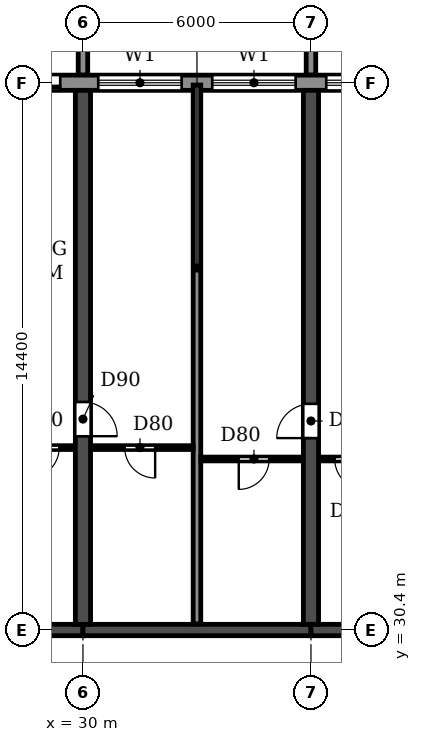
"""IFC4 building model, lengths in metres.
Left out: names, types, materials, properties, quantities, classifications, styles, units other than length and angle.
Written with IfcOpenShell. Run it as: python <this file> out.ifc"""

import sys

from ifc_helpers import new_model, si_unit, direction, frame, frame_2d, origin, place, context, subcontext, project, spatial, polyline, rectangle, outline, extrude, source, transform, mapped, element, fill, save


model = new_model("IFC4")
c1 = context("Model", 3, precision=1e-05, world=origin(), true_north=direction((0.0, 1.0)))
c2 = subcontext(c1, "Body", "Model", "MODEL_VIEW")
j1 = project(units=[si_unit("LENGTHUNIT", "METRE"), si_unit("PLANEANGLEUNIT", "RADIAN")], contexts=[c1])
p1 = place(None, origin())
s1 = spatial("IfcSite", under=j1, at=p1, CompositionType="ELEMENT")
p2 = place(p1, origin())
s2 = spatial("IfcBuilding", under=s1, at=p2, CompositionType="ELEMENT")
p3 = place(p2, frame((0.0, 0.0, 33.3)))
s3 = spatial("IfcBuildingStorey", under=s2, at=p3, CompositionType="ELEMENT", Elevation=33.3)
p4 = place(p3, frame((30.0, 30.55, 0.0), z_axis=(0.0, 0.0, 1.0), x_axis=(0.0, 1.0, 0.0)))
e1 = element("IfcWall", 1, at=p4, inside=s3, PredefinedType="SHEAR", context=c2, shape_type="SweptSolid", body=[
    extrude(rectangle(XDim=14.05, YDim=0.4, at=frame_2d((7.025, 0.0))), origin(), (0.0, 0.0, 1.0), 3.05),
])
p5 = place(p4, frame((4.95, 0.0, 0.0)))
e2 = element("IfcOpeningElement", 2, at=p5, cuts=e1, PredefinedType="OPENING", context=c2, shape_type="SweptSolid", body=[
    extrude(rectangle(XDim=0.9, YDim=2.1, at=frame_2d((0.45, 1.05))), frame((0.0, 0.21, 0.0), z_axis=(0.0, -1.0, 0.0), x_axis=(1.0, 0.0, 0.0)), (0.0, 0.0, 1.0), 0.42),
])
p6 = place(p3, frame((36.0, 30.55, 0.0), z_axis=(0.0, 0.0, 1.0), x_axis=(0.0, 1.0, 0.0)))
e3 = element("IfcWall", 3, at=p6, inside=s3, PredefinedType="SHEAR", context=c2, shape_type="SweptSolid", body=[
    extrude(rectangle(XDim=14.05, YDim=0.4, at=frame_2d((7.025, 0.0))), origin(), (0.0, 0.0, 1.0), 3.05),
])
p7 = place(p6, frame((4.9, 0.0, 0.0)))
e4 = element("IfcOpeningElement", 4, at=p7, cuts=e3, PredefinedType="OPENING", context=c2, shape_type="SweptSolid", body=[
    extrude(rectangle(XDim=0.9, YDim=2.1, at=frame_2d((0.45, 1.05))), frame((0.0, 0.21, 0.0), z_axis=(0.0, -1.0, 0.0), x_axis=(1.0, 0.0, 0.0)), (0.0, 0.0, 1.0), 0.42),
])
p8 = place(p3, frame((24.0, 30.4, 0.0), z_axis=(0.0, 0.0, 1.0), x_axis=(1.0, 0.0, 0.0)))
e5 = element("IfcWall", 5, at=p8, inside=s3, PredefinedType="SHEAR", context=c2, shape_type="SweptSolid", body=[
    extrude(rectangle(XDim=6.0, YDim=0.3, at=frame_2d((3.0, 0.0))), origin(), (0.0, 0.0, 1.0), 2.45),
])
p9 = place(p8, frame((2.55, 0.0, 0.0)))
e6 = element("IfcOpeningElement", 6, at=p9, cuts=e5, PredefinedType="OPENING", context=c2, shape_type="SweptSolid", body=[
    extrude(rectangle(XDim=1.0, YDim=2.1, at=frame_2d((0.5, 1.05))), frame((0.0, 0.16, 0.0), z_axis=(0.0, -1.0, 0.0), x_axis=(1.0, 0.0, 0.0)), (0.0, 0.0, 1.0), 0.32),
])
p10 = place(p3, frame((30.0, 30.4, 0.0), z_axis=(0.0, 0.0, 1.0), x_axis=(1.0, 0.0, 0.0)))
e7 = element("IfcWall", 7, at=p10, inside=s3, PredefinedType="SHEAR", context=c2, shape_type="SweptSolid", body=[
    extrude(rectangle(XDim=6.0, YDim=0.3, at=frame_2d((3.0, 0.0))), origin(), (0.0, 0.0, 1.0), 2.45),
])
p11 = place(p3, frame((36.0, 30.4, 0.0), z_axis=(0.0, 0.0, 1.0), x_axis=(1.0, 0.0, 0.0)))
e8 = element("IfcWall", 8, at=p11, inside=s3, PredefinedType="SHEAR", context=c2, shape_type="SweptSolid", body=[
    extrude(rectangle(XDim=6.0, YDim=0.3, at=frame_2d((3.0, 0.0))), origin(), (0.0, 0.0, 1.0), 2.45),
])
p12 = place(p11, frame((2.45, 0.0, 0.0)))
e9 = element("IfcOpeningElement", 9, at=p12, cuts=e8, PredefinedType="OPENING", context=c2, shape_type="SweptSolid", body=[
    extrude(rectangle(XDim=1.0, YDim=2.1, at=frame_2d((0.5, 1.05))), frame((0.0, 0.16, 0.0), z_axis=(0.0, -1.0, 0.0), x_axis=(1.0, 0.0, 0.0)), (0.0, 0.0, 1.0), 0.32),
])
p13 = place(p3, frame((97.317, 44.8, 0.0), z_axis=(0.0, 0.0, 1.0), x_axis=(-1.0, 0.0, 0.0)))
e10 = element("IfcWall", 10, at=p13, inside=s3, PredefinedType="STANDARD", context=c2, shape_type="SweptSolid", body=[
    extrude(rectangle(XDim=92.634, YDim=0.4, at=frame_2d((46.317, 0.0))), origin(), (0.0, 0.0, 1.0), 3.05),
])
p14 = place(p13, frame((88.717, 0.0, 0.9)))
e11 = element("IfcOpeningElement", 11, at=p14, cuts=e10, PredefinedType="OPENING", context=c2, shape_type="SweptSolid", body=[
    extrude(rectangle(XDim=2.2, YDim=1.5, at=frame_2d((1.1, 0.75))), frame((0.0, 0.21, 0.0), z_axis=(0.0, -1.0, 0.0), x_axis=(1.0, 0.0, 0.0)), (0.0, 0.0, 1.0), 0.42),
])
p15 = place(p13, frame((85.917, 0.0, 0.0)))
e12 = element("IfcOpeningElement", 12, at=p15, cuts=e10, PredefinedType="OPENING", context=c2, shape_type="SweptSolid", body=[
    extrude(rectangle(XDim=1.8, YDim=2.4, at=frame_2d((0.9, 1.2))), frame((0.0, 0.21, 0.0), z_axis=(0.0, -1.0, 0.0), x_axis=(1.0, 0.0, 0.0)), (0.0, 0.0, 1.0), 0.42),
])
p16 = place(p13, frame((82.717, 0.0, 0.9)))
e13 = element("IfcOpeningElement", 13, at=p16, cuts=e10, PredefinedType="OPENING", context=c2, shape_type="SweptSolid", body=[
    extrude(rectangle(XDim=2.2, YDim=1.5, at=frame_2d((1.1, 0.75))), frame((0.0, 0.21, 0.0), z_axis=(0.0, -1.0, 0.0), x_axis=(1.0, 0.0, 0.0)), (0.0, 0.0, 1.0), 0.42),
])
p17 = place(p13, frame((79.917, 0.0, 0.0)))
e14 = element("IfcOpeningElement", 14, at=p17, cuts=e10, PredefinedType="OPENING", context=c2, shape_type="SweptSolid", body=[
    extrude(rectangle(XDim=1.8, YDim=2.4, at=frame_2d((0.9, 1.2))), frame((0.0, 0.21, 0.0), z_axis=(0.0, -1.0, 0.0), x_axis=(1.0, 0.0, 0.0)), (0.0, 0.0, 1.0), 0.42),
])
p18 = place(p13, frame((76.717, 0.0, 0.9)))
e15 = element("IfcOpeningElement", 15, at=p18, cuts=e10, PredefinedType="OPENING", context=c2, shape_type="SweptSolid", body=[
    extrude(rectangle(XDim=2.2, YDim=1.5, at=frame_2d((1.1, 0.75))), frame((0.0, 0.21, 0.0), z_axis=(0.0, -1.0, 0.0), x_axis=(1.0, 0.0, 0.0)), (0.0, 0.0, 1.0), 0.42),
])
p19 = place(p13, frame((73.717, 0.0, 0.9)))
e16 = element("IfcOpeningElement", 16, at=p19, cuts=e10, PredefinedType="OPENING", context=c2, shape_type="SweptSolid", body=[
    extrude(rectangle(XDim=2.2, YDim=1.5, at=frame_2d((1.1, 0.75))), frame((0.0, 0.21, 0.0), z_axis=(0.0, -1.0, 0.0), x_axis=(1.0, 0.0, 0.0)), (0.0, 0.0, 1.0), 0.42),
])
p20 = place(p13, frame((70.717, 0.0, 0.9)))
e17 = element("IfcOpeningElement", 17, at=p20, cuts=e10, PredefinedType="OPENING", context=c2, shape_type="SweptSolid", body=[
    extrude(rectangle(XDim=2.2, YDim=1.5, at=frame_2d((1.1, 0.75))), frame((0.0, 0.21, 0.0), z_axis=(0.0, -1.0, 0.0), x_axis=(1.0, 0.0, 0.0)), (0.0, 0.0, 1.0), 0.42),
])
p21 = place(p13, frame((67.917, 0.0, 0.0)))
e18 = element("IfcOpeningElement", 18, at=p21, cuts=e10, PredefinedType="OPENING", context=c2, shape_type="SweptSolid", body=[
    extrude(rectangle(XDim=1.8, YDim=2.4, at=frame_2d((0.9, 1.2))), frame((0.0, 0.21, 0.0), z_axis=(0.0, -1.0, 0.0), x_axis=(1.0, 0.0, 0.0)), (0.0, 0.0, 1.0), 0.42),
])
p22 = place(p13, frame((64.717, 0.0, 0.9)))
e19 = element("IfcOpeningElement", 19, at=p22, cuts=e10, PredefinedType="OPENING", context=c2, shape_type="SweptSolid", body=[
    extrude(rectangle(XDim=2.2, YDim=1.5, at=frame_2d((1.1, 0.75))), frame((0.0, 0.21, 0.0), z_axis=(0.0, -1.0, 0.0), x_axis=(1.0, 0.0, 0.0)), (0.0, 0.0, 1.0), 0.42),
])
p23 = place(p13, frame((61.717, 0.0, 0.9)))
e20 = element("IfcOpeningElement", 20, at=p23, cuts=e10, PredefinedType="OPENING", context=c2, shape_type="SweptSolid", body=[
    extrude(rectangle(XDim=2.2, YDim=1.5, at=frame_2d((1.1, 0.75))), frame((0.0, 0.21, 0.0), z_axis=(0.0, -1.0, 0.0), x_axis=(1.0, 0.0, 0.0)), (0.0, 0.0, 1.0), 0.42),
])
p24 = place(p13, frame((58.717, 0.0, 0.9)))
e21 = element("IfcOpeningElement", 21, at=p24, cuts=e10, PredefinedType="OPENING", context=c2, shape_type="SweptSolid", body=[
    extrude(rectangle(XDim=2.2, YDim=1.5, at=frame_2d((1.1, 0.75))), frame((0.0, 0.21, 0.0), z_axis=(0.0, -1.0, 0.0), x_axis=(1.0, 0.0, 0.0)), (0.0, 0.0, 1.0), 0.42),
])
p25 = place(p13, frame((55.917, 0.0, 0.0)))
e22 = element("IfcOpeningElement", 22, at=p25, cuts=e10, PredefinedType="OPENING", context=c2, shape_type="SweptSolid", body=[
    extrude(rectangle(XDim=1.8, YDim=2.4, at=frame_2d((0.9, 1.2))), frame((0.0, 0.21, 0.0), z_axis=(0.0, -1.0, 0.0), x_axis=(1.0, 0.0, 0.0)), (0.0, 0.0, 1.0), 0.42),
])
p26 = place(p13, frame((52.717, 0.0, 0.9)))
e23 = element("IfcOpeningElement", 23, at=p26, cuts=e10, PredefinedType="OPENING", context=c2, shape_type="SweptSolid", body=[
    extrude(rectangle(XDim=2.2, YDim=1.5, at=frame_2d((1.1, 0.75))), frame((0.0, 0.21, 0.0), z_axis=(0.0, -1.0, 0.0), x_axis=(1.0, 0.0, 0.0)), (0.0, 0.0, 1.0), 0.42),
])
p27 = place(p13, frame((49.717, 0.0, 0.9)))
e24 = element("IfcOpeningElement", 24, at=p27, cuts=e10, PredefinedType="OPENING", context=c2, shape_type="SweptSolid", body=[
    extrude(rectangle(XDim=2.2, YDim=1.5, at=frame_2d((1.1, 0.75))), frame((0.0, 0.21, 0.0), z_axis=(0.0, -1.0, 0.0), x_axis=(1.0, 0.0, 0.0)), (0.0, 0.0, 1.0), 0.42),
])
p28 = place(p13, frame((46.717, 0.0, 0.9)))
e25 = element("IfcOpeningElement", 25, at=p28, cuts=e10, PredefinedType="OPENING", context=c2, shape_type="SweptSolid", body=[
    extrude(rectangle(XDim=2.2, YDim=1.5, at=frame_2d((1.1, 0.75))), frame((0.0, 0.21, 0.0), z_axis=(0.0, -1.0, 0.0), x_axis=(1.0, 0.0, 0.0)), (0.0, 0.0, 1.0), 0.42),
])
p29 = place(p13, frame((43.917, 0.0, 0.0)))
e26 = element("IfcOpeningElement", 26, at=p29, cuts=e10, PredefinedType="OPENING", context=c2, shape_type="SweptSolid", body=[
    extrude(rectangle(XDim=1.8, YDim=2.4, at=frame_2d((0.9, 1.2))), frame((0.0, 0.21, 0.0), z_axis=(0.0, -1.0, 0.0), x_axis=(1.0, 0.0, 0.0)), (0.0, 0.0, 1.0), 0.42),
])
p30 = place(p13, frame((40.717, 0.0, 0.9)))
e27 = element("IfcOpeningElement", 27, at=p30, cuts=e10, PredefinedType="OPENING", context=c2, shape_type="SweptSolid", body=[
    extrude(rectangle(XDim=2.2, YDim=1.5, at=frame_2d((1.1, 0.75))), frame((0.0, 0.21, 0.0), z_axis=(0.0, -1.0, 0.0), x_axis=(1.0, 0.0, 0.0)), (0.0, 0.0, 1.0), 0.42),
])
p31 = place(p13, frame((37.717, 0.0, 0.9)))
e28 = element("IfcOpeningElement", 28, at=p31, cuts=e10, PredefinedType="OPENING", context=c2, shape_type="SweptSolid", body=[
    extrude(rectangle(XDim=2.2, YDim=1.5, at=frame_2d((1.1, 0.75))), frame((0.0, 0.21, 0.0), z_axis=(0.0, -1.0, 0.0), x_axis=(1.0, 0.0, 0.0)), (0.0, 0.0, 1.0), 0.42),
])
p32 = place(p13, frame((34.717, 0.0, 0.9)))
e29 = element("IfcOpeningElement", 29, at=p32, cuts=e10, PredefinedType="OPENING", context=c2, shape_type="SweptSolid", body=[
    extrude(rectangle(XDim=2.2, YDim=1.5, at=frame_2d((1.1, 0.75))), frame((0.0, 0.21, 0.0), z_axis=(0.0, -1.0, 0.0), x_axis=(1.0, 0.0, 0.0)), (0.0, 0.0, 1.0), 0.42),
])
p33 = place(p13, frame((31.917, 0.0, 0.0)))
e30 = element("IfcOpeningElement", 30, at=p33, cuts=e10, PredefinedType="OPENING", context=c2, shape_type="SweptSolid", body=[
    extrude(rectangle(XDim=1.8, YDim=2.4, at=frame_2d((0.9, 1.2))), frame((0.0, 0.21, 0.0), z_axis=(0.0, -1.0, 0.0), x_axis=(1.0, 0.0, 0.0)), (0.0, 0.0, 1.0), 0.42),
])
p34 = place(p13, frame((28.717, 0.0, 0.9)))
e31 = element("IfcOpeningElement", 31, at=p34, cuts=e10, PredefinedType="OPENING", context=c2, shape_type="SweptSolid", body=[
    extrude(rectangle(XDim=2.2, YDim=1.5, at=frame_2d((1.1, 0.75))), frame((0.0, 0.21, 0.0), z_axis=(0.0, -1.0, 0.0), x_axis=(1.0, 0.0, 0.0)), (0.0, 0.0, 1.0), 0.42),
])
p35 = place(p13, frame((25.717, 0.0, 0.9)))
e32 = element("IfcOpeningElement", 32, at=p35, cuts=e10, PredefinedType="OPENING", context=c2, shape_type="SweptSolid", body=[
    extrude(rectangle(XDim=2.2, YDim=1.5, at=frame_2d((1.1, 0.75))), frame((0.0, 0.21, 0.0), z_axis=(0.0, -1.0, 0.0), x_axis=(1.0, 0.0, 0.0)), (0.0, 0.0, 1.0), 0.42),
])
p36 = place(p13, frame((22.917, 0.0, 0.0)))
e33 = element("IfcOpeningElement", 33, at=p36, cuts=e10, PredefinedType="OPENING", context=c2, shape_type="SweptSolid", body=[
    extrude(rectangle(XDim=1.8, YDim=2.4, at=frame_2d((0.9, 1.2))), frame((0.0, 0.21, 0.0), z_axis=(0.0, -1.0, 0.0), x_axis=(1.0, 0.0, 0.0)), (0.0, 0.0, 1.0), 0.42),
])
p37 = place(p13, frame((19.717, 0.0, 0.9)))
e34 = element("IfcOpeningElement", 34, at=p37, cuts=e10, PredefinedType="OPENING", context=c2, shape_type="SweptSolid", body=[
    extrude(rectangle(XDim=2.2, YDim=1.5, at=frame_2d((1.1, 0.75))), frame((0.0, 0.21, 0.0), z_axis=(0.0, -1.0, 0.0), x_axis=(1.0, 0.0, 0.0)), (0.0, 0.0, 1.0), 0.42),
])
p38 = place(p13, frame((16.717, 0.0, 0.9)))
e35 = element("IfcOpeningElement", 35, at=p38, cuts=e10, PredefinedType="OPENING", context=c2, shape_type="SweptSolid", body=[
    extrude(rectangle(XDim=2.2, YDim=1.5, at=frame_2d((1.1, 0.75))), frame((0.0, 0.21, 0.0), z_axis=(0.0, -1.0, 0.0), x_axis=(1.0, 0.0, 0.0)), (0.0, 0.0, 1.0), 0.42),
])
p39 = place(p13, frame((13.917, 0.0, 0.0)))
e36 = element("IfcOpeningElement", 36, at=p39, cuts=e10, PredefinedType="OPENING", context=c2, shape_type="SweptSolid", body=[
    extrude(rectangle(XDim=1.8, YDim=2.4, at=frame_2d((0.9, 1.2))), frame((0.0, 0.21, 0.0), z_axis=(0.0, -1.0, 0.0), x_axis=(1.0, 0.0, 0.0)), (0.0, 0.0, 1.0), 0.42),
])
p40 = place(p13, frame((10.717, 0.0, 0.9)))
e37 = element("IfcOpeningElement", 37, at=p40, cuts=e10, PredefinedType="OPENING", context=c2, shape_type="SweptSolid", body=[
    extrude(rectangle(XDim=2.2, YDim=1.5, at=frame_2d((1.1, 0.75))), frame((0.0, 0.21, 0.0), z_axis=(0.0, -1.0, 0.0), x_axis=(1.0, 0.0, 0.0)), (0.0, 0.0, 1.0), 0.42),
])
p41 = place(p13, frame((7.917, 0.0, 0.0)))
e38 = element("IfcOpeningElement", 38, at=p41, cuts=e10, PredefinedType="OPENING", context=c2, shape_type="SweptSolid", body=[
    extrude(rectangle(XDim=1.8, YDim=2.4, at=frame_2d((0.9, 1.2))), frame((0.0, 0.21, 0.0), z_axis=(0.0, -1.0, 0.0), x_axis=(1.0, 0.0, 0.0)), (0.0, 0.0, 1.0), 0.42),
])
p42 = place(p13, frame((4.717, 0.0, 0.9)))
e39 = element("IfcOpeningElement", 39, at=p42, cuts=e10, PredefinedType="OPENING", context=c2, shape_type="SweptSolid", body=[
    extrude(rectangle(XDim=2.2, YDim=1.5, at=frame_2d((1.1, 0.75))), frame((0.0, 0.21, 0.0), z_axis=(0.0, -1.0, 0.0), x_axis=(1.0, 0.0, 0.0)), (0.0, 0.0, 1.0), 0.42),
])
p43 = place(p13, frame((1.917, 0.0, 0.0)))
e40 = element("IfcOpeningElement", 40, at=p43, cuts=e10, PredefinedType="OPENING", context=c2, shape_type="SweptSolid", body=[
    extrude(rectangle(XDim=1.8, YDim=2.4, at=frame_2d((0.9, 1.2))), frame((0.0, 0.21, 0.0), z_axis=(0.0, -1.0, 0.0), x_axis=(1.0, 0.0, 0.0)), (0.0, 0.0, 1.0), 0.42),
])
m1 = source(origin(), c2, "Body", "SweptSolid", [
    extrude(outline(polyline([(0.0, 0.0), (0.25, 0.0), (0.25, 3.1), (0.0, 3.1), (0.0, 0.0)])), origin(), (0.0, 0.0, 1.0), 3.1),
])
for number, where in (
    (41, (29.875, 45.0, 0.0)),
    (42, (35.875, 45.0, 0.0)),
):
    element("IfcWall", number, at=place(p3, frame(where)), inside=s3, PredefinedType="STANDARD", context=c2, shape_type="MappedRepresentation", body=[
        mapped(m1, transform((0.0, 0.0, 0.0))),
    ])
p44 = place(p3, frame((33.0, 30.56, 0.0), z_axis=(0.0, 0.0, 1.0), x_axis=(0.0, 1.0, 0.0)))
e43 = element("IfcWall", 43, at=p44, inside=s3, PredefinedType="PARTITIONING", context=c2, shape_type="SweptSolid", body=[
    extrude(rectangle(XDim=14.18, YDim=0.2, at=frame_2d((7.09, 0.0))), origin(), (0.0, 0.0, 1.0), 3.05),
])
p45 = place(p3, frame((33.1, 34.9, 0.0), z_axis=(0.0, 0.0, 1.0), x_axis=(1.0, 0.0, 0.0)))
e44 = element("IfcWall", 44, at=p45, inside=s3, PredefinedType="PARTITIONING", context=c2, shape_type="SweptSolid", body=[
    extrude(rectangle(XDim=2.69, YDim=0.1, at=frame_2d((1.345, 0.0))), origin(), (0.0, 0.0, 1.0), 3.05),
])
p46 = place(p45, frame((1.0, 0.0, 0.0)))
e45 = element("IfcOpeningElement", 45, at=p46, cuts=e44, PredefinedType="OPENING", context=c2, shape_type="SweptSolid", body=[
    extrude(rectangle(XDim=0.8, YDim=2.1, at=frame_2d((0.4, 1.05))), frame((0.0, 0.06, 0.0), z_axis=(0.0, -1.0, 0.0), x_axis=(1.0, 0.0, 0.0)), (0.0, 0.0, 1.0), 0.12),
])
p47 = place(p3, frame((36.21, 34.9, 0.0), z_axis=(0.0, 0.0, 1.0), x_axis=(1.0, 0.0, 0.0)))
e46 = element("IfcWall", 46, at=p47, inside=s3, PredefinedType="PARTITIONING", context=c2, shape_type="SweptSolid", body=[
    extrude(rectangle(XDim=1.89, YDim=0.1, at=frame_2d((0.945, 0.0))), origin(), (0.0, 0.0, 1.0), 3.05),
])
p48 = place(p47, frame((0.415, 0.0, 0.0)))
e47 = element("IfcOpeningElement", 47, at=p48, cuts=e46, PredefinedType="OPENING", context=c2, shape_type="SweptSolid", body=[
    extrude(rectangle(XDim=0.8, YDim=2.1, at=frame_2d((0.4, 1.05))), frame((0.0, 0.06, 0.0), z_axis=(0.0, -1.0, 0.0), x_axis=(1.0, 0.0, 0.0)), (0.0, 0.0, 1.0), 0.12),
])
p49 = place(p3, frame((27.9, 35.2, 0.0), z_axis=(0.0, 0.0, 1.0), x_axis=(1.0, 0.0, 0.0)))
e48 = element("IfcWall", 48, at=p49, inside=s3, PredefinedType="PARTITIONING", context=c2, shape_type="SweptSolid", body=[
    extrude(rectangle(XDim=1.89, YDim=0.1, at=frame_2d((0.945, 0.0))), origin(), (0.0, 0.0, 1.0), 3.05),
])
p50 = place(p49, frame((0.675, 0.0, 0.0)))
e49 = element("IfcOpeningElement", 49, at=p50, cuts=e48, PredefinedType="OPENING", context=c2, shape_type="SweptSolid", body=[
    extrude(rectangle(XDim=0.8, YDim=2.1, at=frame_2d((0.4, 1.05))), frame((0.0, 0.06, 0.0), z_axis=(0.0, -1.0, 0.0), x_axis=(1.0, 0.0, 0.0)), (0.0, 0.0, 1.0), 0.12),
])
p51 = place(p3, frame((30.21, 35.2, 0.0), z_axis=(0.0, 0.0, 1.0), x_axis=(1.0, 0.0, 0.0)))
e50 = element("IfcWall", 50, at=p51, inside=s3, PredefinedType="PARTITIONING", context=c2, shape_type="SweptSolid", body=[
    extrude(rectangle(XDim=2.69, YDim=0.1, at=frame_2d((1.345, 0.0))), origin(), (0.0, 0.0, 1.0), 3.05),
])
p52 = place(p51, frame((0.89, 0.0, 0.0)))
e51 = element("IfcOpeningElement", 51, at=p52, cuts=e50, PredefinedType="OPENING", context=c2, shape_type="SweptSolid", body=[
    extrude(rectangle(XDim=0.8, YDim=2.1, at=frame_2d((0.4, 1.05))), frame((0.0, 0.06, 0.0), z_axis=(0.0, -1.0, 0.0), x_axis=(1.0, 0.0, 0.0)), (0.0, 0.0, 1.0), 0.12),
])
p53 = place(p21, origin())
e52 = element("IfcDoor", 52, at=p53, inside=s3, OperationType="DOUBLE_DOOR_SLIDING", PredefinedType="DOOR", context=c2, shape_type="SweptSolid", body=[
    extrude(rectangle(XDim=1.8, YDim=2.4, at=frame_2d((0.9, 1.2))), frame((0.0, 0.025, 0.0), z_axis=(0.0, -1.0, 0.0), x_axis=(1.0, 0.0, 0.0)), (0.0, 0.0, 1.0), 0.05),
])
fill(e18, e52)
p54 = place(p22, origin())
e53 = element("IfcWindow", 53, at=p54, inside=s3, PartitioningType="DOUBLE_PANEL_HORIZONTAL", PredefinedType="WINDOW", context=c2, shape_type="SweptSolid", body=[
    extrude(rectangle(XDim=2.2, YDim=1.5, at=frame_2d((1.1, 0.75))), frame((0.0, 0.03, 0.0), z_axis=(0.0, -1.0, 0.0), x_axis=(1.0, 0.0, 0.0)), (0.0, 0.0, 1.0), 0.06),
])
fill(e19, e53)
p55 = place(p23, origin())
e54 = element("IfcWindow", 54, at=p55, inside=s3, PartitioningType="DOUBLE_PANEL_HORIZONTAL", PredefinedType="WINDOW", context=c2, shape_type="SweptSolid", body=[
    extrude(rectangle(XDim=2.2, YDim=1.5, at=frame_2d((1.1, 0.75))), frame((0.0, 0.03, 0.0), z_axis=(0.0, -1.0, 0.0), x_axis=(1.0, 0.0, 0.0)), (0.0, 0.0, 1.0), 0.06),
])
fill(e20, e54)
p56 = place(p24, origin())
e55 = element("IfcWindow", 55, at=p56, inside=s3, PartitioningType="DOUBLE_PANEL_HORIZONTAL", PredefinedType="WINDOW", context=c2, shape_type="SweptSolid", body=[
    extrude(rectangle(XDim=2.2, YDim=1.5, at=frame_2d((1.1, 0.75))), frame((0.0, 0.03, 0.0), z_axis=(0.0, -1.0, 0.0), x_axis=(1.0, 0.0, 0.0)), (0.0, 0.0, 1.0), 0.06),
])
fill(e21, e55)
p57 = place(p52, frame((0.8, 0.0, 0.0), z_axis=(0.0, 0.0, 1.0), x_axis=(-1.0, 0.0, 0.0)))
e56 = element("IfcDoor", 56, at=p57, inside=s3, OperationType="SINGLE_SWING_LEFT", PredefinedType="DOOR", context=c2, shape_type="SweptSolid", body=[
    extrude(rectangle(XDim=0.8, YDim=2.1, at=frame_2d((0.4, 1.05))), frame((0.0, 0.025, 0.0), z_axis=(0.0, -1.0, 0.0), x_axis=(1.0, 0.0, 0.0)), (0.0, 0.0, 1.0), 0.05),
])
fill(e51, e56)
p58 = place(p50, frame((0.8, 0.0, 0.0), z_axis=(0.0, 0.0, 1.0), x_axis=(-1.0, 0.0, 0.0)))
e57 = element("IfcDoor", 57, at=p58, inside=s3, OperationType="SINGLE_SWING_RIGHT", PredefinedType="DOOR", context=c2, shape_type="SweptSolid", body=[
    extrude(rectangle(XDim=0.8, YDim=2.1, at=frame_2d((0.4, 1.05))), frame((0.0, 0.025, 0.0), z_axis=(0.0, -1.0, 0.0), x_axis=(1.0, 0.0, 0.0)), (0.0, 0.0, 1.0), 0.05),
])
fill(e49, e57)
p59 = place(p5, frame((0.9, 0.0, 0.0), z_axis=(0.0, 0.0, 1.0), x_axis=(-1.0, 0.0, 0.0)))
e58 = element("IfcDoor", 58, at=p59, inside=s3, OperationType="SINGLE_SWING_RIGHT", PredefinedType="DOOR", context=c2, shape_type="SweptSolid", body=[
    extrude(rectangle(XDim=0.9, YDim=2.1, at=frame_2d((0.45, 1.05))), frame((0.0, 0.025, 0.0), z_axis=(0.0, -1.0, 0.0), x_axis=(1.0, 0.0, 0.0)), (0.0, 0.0, 1.0), 0.05),
])
fill(e2, e58)
p60 = place(p46, frame((0.8, 0.0, 0.0), z_axis=(0.0, 0.0, 1.0), x_axis=(-1.0, 0.0, 0.0)))
e59 = element("IfcDoor", 59, at=p60, inside=s3, OperationType="SINGLE_SWING_RIGHT", PredefinedType="DOOR", context=c2, shape_type="SweptSolid", body=[
    extrude(rectangle(XDim=0.8, YDim=2.1, at=frame_2d((0.4, 1.05))), frame((0.0, 0.025, 0.0), z_axis=(0.0, -1.0, 0.0), x_axis=(1.0, 0.0, 0.0)), (0.0, 0.0, 1.0), 0.05),
])
fill(e45, e59)
p61 = place(p7, origin())
e60 = element("IfcDoor", 60, at=p61, inside=s3, OperationType="SINGLE_SWING_LEFT", PredefinedType="DOOR", context=c2, shape_type="SweptSolid", body=[
    extrude(rectangle(XDim=0.9, YDim=2.1, at=frame_2d((0.45, 1.05))), frame((0.0, 0.025, 0.0), z_axis=(0.0, -1.0, 0.0), x_axis=(1.0, 0.0, 0.0)), (0.0, 0.0, 1.0), 0.05),
])
fill(e4, e60)
p62 = place(p48, frame((0.8, 0.0, 0.0), z_axis=(0.0, 0.0, 1.0), x_axis=(-1.0, 0.0, 0.0)))
e61 = element("IfcDoor", 61, at=p62, inside=s3, OperationType="SINGLE_SWING_LEFT", PredefinedType="DOOR", context=c2, shape_type="SweptSolid", body=[
    extrude(rectangle(XDim=0.8, YDim=2.1, at=frame_2d((0.4, 1.05))), frame((0.0, 0.025, 0.0), z_axis=(0.0, -1.0, 0.0), x_axis=(1.0, 0.0, 0.0)), (0.0, 0.0, 1.0), 0.05),
])
fill(e47, e61)
save(model, sys.argv[1])
